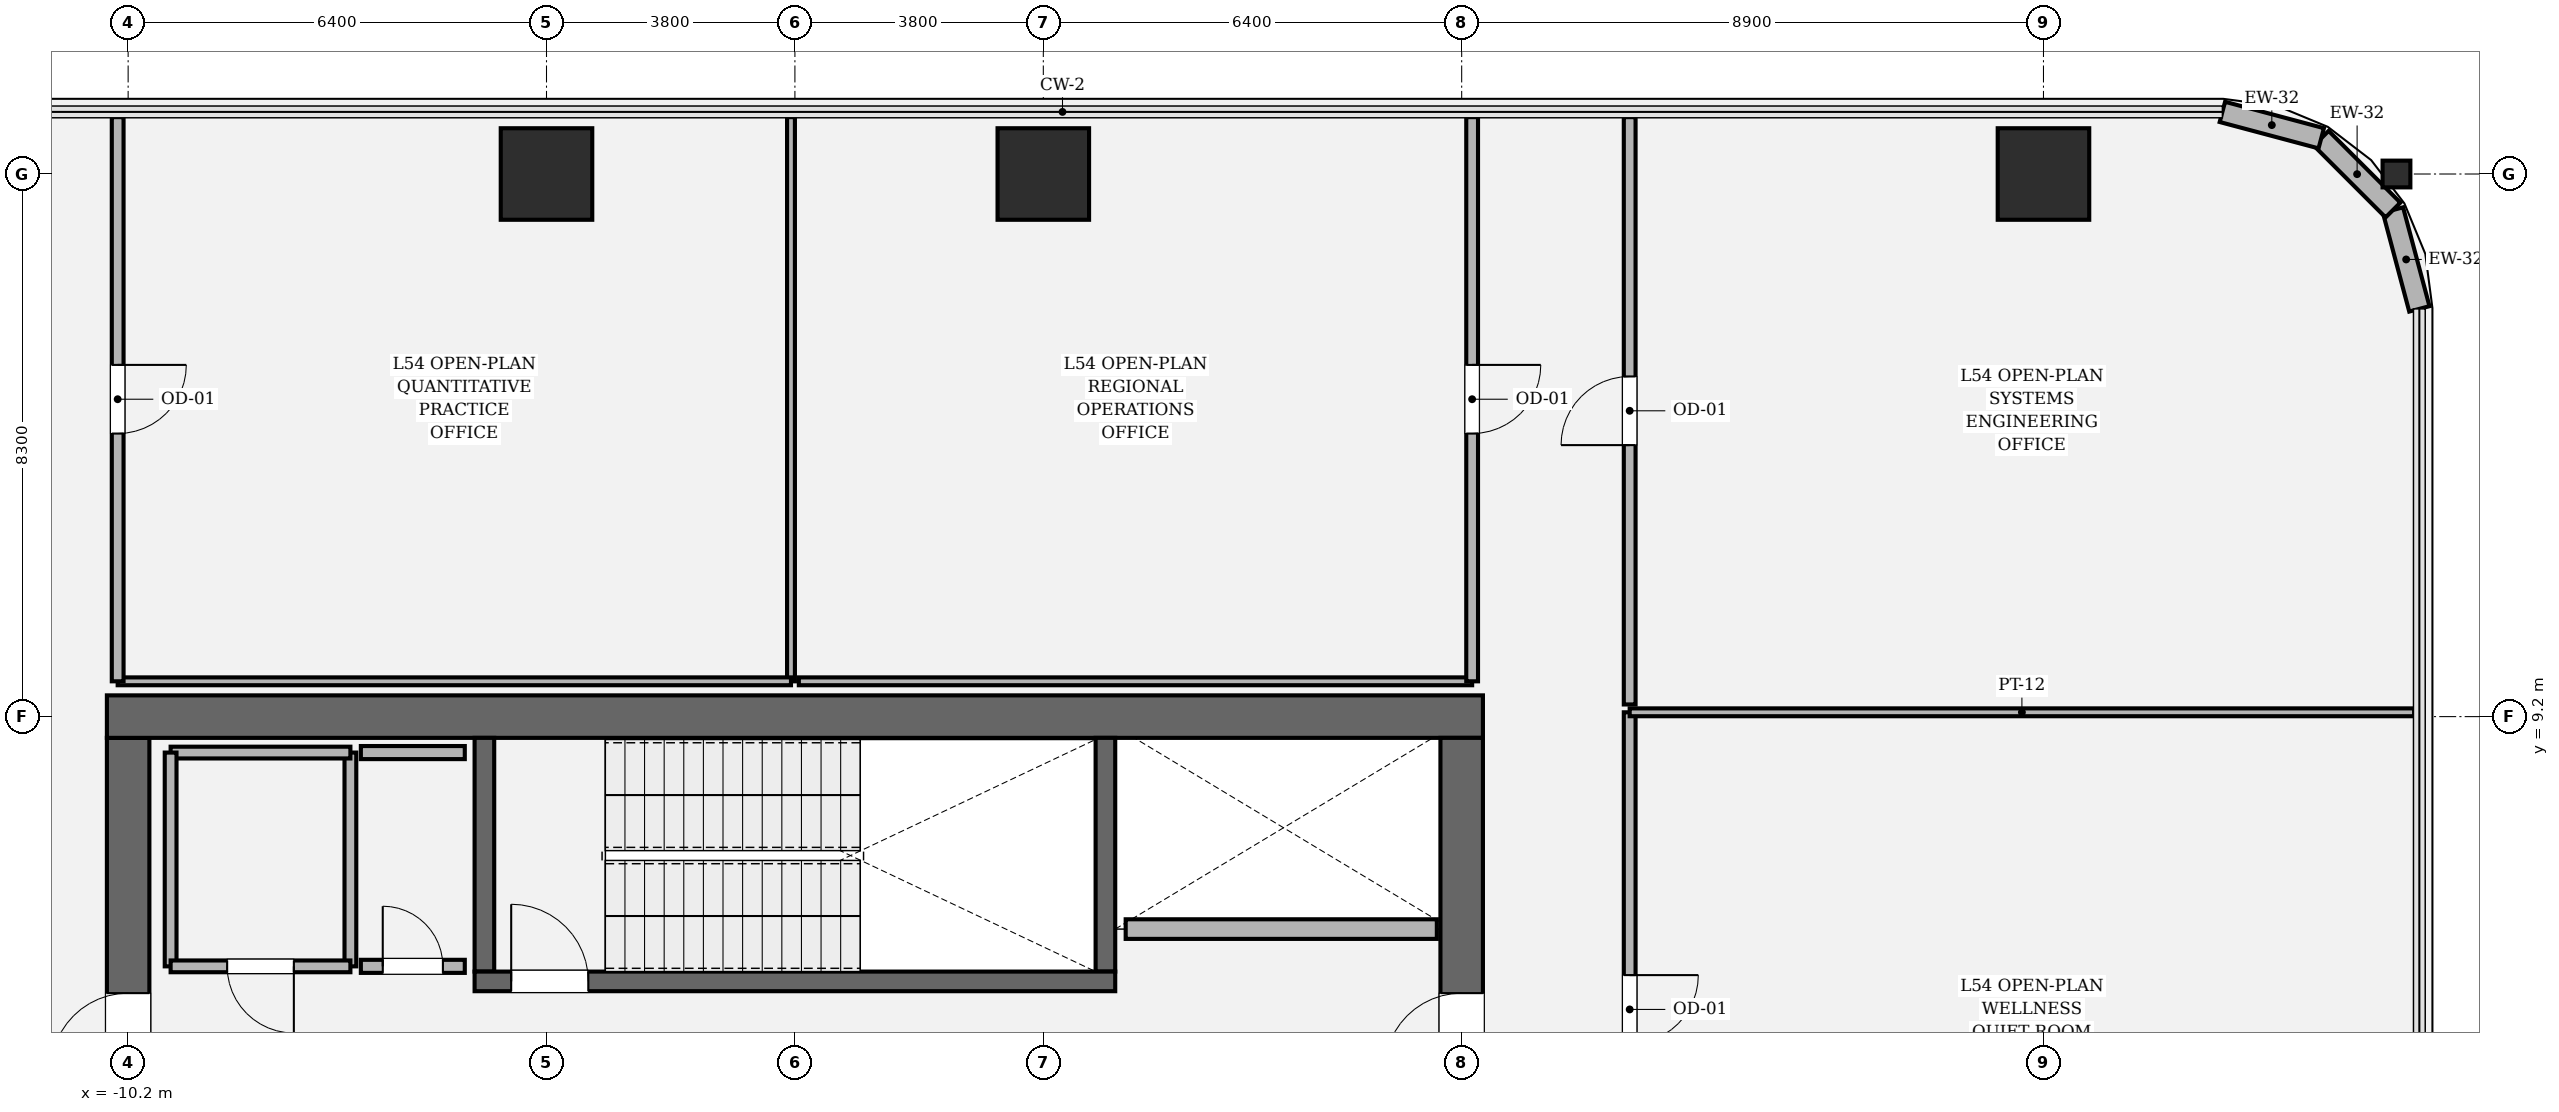
"""IFC4 building model, lengths in metres.
Left out: names, types, materials, properties, quantities, classifications, styles, units other than length and angle.
Written with IfcOpenShell. Run it as: python <this file> out.ifc"""

import sys

from ifc_helpers import new_model, si_unit, direction, frame, frame_2d, origin, origin_2d, place, context, subcontext, project, spatial, rectangle, hollow_rectangle, i_section, extrude, element, fill, save


model = new_model("IFC4")
c1 = context("Model", 3, precision=1e-05, world=origin(), true_north=direction((0.0, 1.0)))
c2 = subcontext(c1, "Body", "Model", "MODEL_VIEW")
j1 = project(units=[si_unit("LENGTHUNIT", "METRE"), si_unit("PLANEANGLEUNIT", "RADIAN")], contexts=[c1])
p1 = place(None, origin())
s1 = spatial("IfcSite", under=j1, at=p1, CompositionType="ELEMENT")
p2 = place(p1, origin())
s2 = spatial("IfcBuilding", under=s1, at=p2, CompositionType="ELEMENT")
p3 = place(p2, frame((0.0, 0.0, 228.9)))
s3 = spatial("IfcBuildingStorey", under=s2, at=p3, CompositionType="ELEMENT", Elevation=228.9)
p4 = place(p3, frame((-10.2, -8.875, 0.0), z_axis=(0.0, 0.0, 1.0), x_axis=(0.0, 1.0, 0.0)))
e1 = element("IfcWall", 1, at=p4, inside=s3, PredefinedType="SHEAR", context=c2, shape_type="SweptSolid", body=[
    extrude(rectangle(XDim=17.75, YDim=0.65, at=frame_2d((8.875, 0.0))), origin(), (0.0, 0.0, 1.0), 4.05),
])
p5 = place(p4, frame((12.665, 0.0, 0.0)))
e2 = element("IfcOpeningElement", 2, at=p5, cuts=e1, PredefinedType="OPENING", context=c2, shape_type="SweptSolid", body=[
    extrude(rectangle(XDim=1.18, YDim=2.2, at=frame_2d((0.59, 1.1))), frame((0.0, 0.335, 0.0), z_axis=(0.0, -1.0, 0.0), x_axis=(1.0, 0.0, 0.0)), (0.0, 0.0, 1.0), 0.67),
])
p6 = place(p3, frame((-10.525, 9.2, 0.0), z_axis=(0.0, 0.0, 1.0), x_axis=(1.0, 0.0, 0.0)))
e3 = element("IfcWall", 3, at=p6, inside=s3, PredefinedType="SHEAR", context=c2, shape_type="SweptSolid", body=[
    extrude(rectangle(XDim=21.05, YDim=0.65, at=frame_2d((10.525, 0.0))), origin(), (0.0, 0.0, 1.0), 4.05),
])
p7 = place(p3, frame((10.2, 8.875, 0.0), z_axis=(0.0, 0.0, 1.0), x_axis=(0.0, -1.0, 0.0)))
e4 = element("IfcWall", 4, at=p7, inside=s3, PredefinedType="SHEAR", context=c2, shape_type="SweptSolid", body=[
    extrude(rectangle(XDim=17.75, YDim=0.65, at=frame_2d((8.875, 0.0))), origin(), (0.0, 0.0, 1.0), 4.05),
])
p8 = place(p7, frame((3.905, 0.0, 0.0)))
e5 = element("IfcOpeningElement", 5, at=p8, cuts=e4, PredefinedType="OPENING", context=c2, shape_type="SweptSolid", body=[
    extrude(rectangle(XDim=1.18, YDim=2.2, at=frame_2d((0.59, 1.1))), frame((0.0, 0.335, 0.0), z_axis=(0.0, -1.0, 0.0), x_axis=(1.0, 0.0, 0.0)), (0.0, 0.0, 1.0), 0.67),
])
for number, where, z_axis, x_axis in (
    (6, (-4.75, 5.3, 0.0), (0.0, 0.0, 1.0), (0.0, 1.0, 0.0)),
    (7, (4.75, 8.875, 0.0), (0.0, 0.0, 1.0), (0.0, -1.0, 0.0)),
):
    element("IfcWall", number, at=place(p3, frame(where, z_axis=z_axis, x_axis=x_axis)), inside=s3, PredefinedType="SOLIDWALL", context=c2, shape_type="SweptSolid", body=[
        extrude(rectangle(XDim=3.575, YDim=0.3, at=frame_2d((1.788, 0.0))), origin(), (0.0, 0.0, 1.0), 4.05),
    ])
p9 = place(p3, frame((-4.9, 5.15, 0.0), z_axis=(0.0, 0.0, 1.0), x_axis=(1.0, 0.0, 0.0)))
e8 = element("IfcWall", 8, at=p9, inside=s3, PredefinedType="SOLIDWALL", context=c2, shape_type="SweptSolid", body=[
    extrude(rectangle(XDim=9.8, YDim=0.3, at=frame_2d((4.9, 0.0))), origin(), (0.0, 0.0, 1.0), 4.05),
])
p10 = place(p9, frame((0.56, 0.0, 0.0)))
e9 = element("IfcOpeningElement", 9, at=p10, cuts=e8, PredefinedType="OPENING", context=c2, shape_type="SweptSolid", body=[
    extrude(rectangle(XDim=1.18, YDim=2.2, at=frame_2d((0.59, 1.1))), frame((0.0, 0.16, 0.0), z_axis=(0.0, -1.0, 0.0), x_axis=(1.0, 0.0, 0.0)), (0.0, 0.0, 1.0), 0.32),
])
for number, where, z_axis, x_axis in (
    (10, (19.1, 17.5, 0.0), (0.0, 0.0, 1.0), (1.0, 0.0, 0.0)),
    (11, (3.8, 17.5, 0.0), (0.0, 0.0, 1.0), (1.0, 0.0, 0.0)),
    (12, (-3.8, 17.5, 0.0), (0.0, 0.0, 1.0), (1.0, 0.0, 0.0)),
):
    element("IfcColumn", number, at=place(p3, frame(where, z_axis=z_axis, x_axis=x_axis)), inside=s3, PredefinedType="COLUMN", context=c2, shape_type="SweptSolid", body=[
        extrude(hollow_rectangle(XDim=1.4, YDim=1.4, WallThickness=0.042, at=origin_2d()), origin(), (0.0, 0.0, 1.0), 4.05),
    ])
p11 = place(p3, frame((24.5, 17.5, 0.0), z_axis=(0.0, 0.0, 1.0), x_axis=(0.0, 1.0, 0.0)))
e13 = element("IfcColumn", 13, at=p11, inside=s3, PredefinedType="COLUMN", context=c2, shape_type="SweptSolid", body=[
    extrude(i_section(OverallWidth=0.409, OverallDepth=0.425, WebThickness=0.032, FlangeThickness=0.052, FilletRadius=0.018, at=origin_2d()), origin(), (0.0, 0.0, 1.0), 4.048),
])
p12 = place(p3, frame((24.85, 15.437, 0.0), z_axis=(0.0, 0.0, 1.0), x_axis=(-0.257847112249, 0.966185730957, 0.0)))
e14 = element("IfcWall", 14, at=p12, inside=s3, PredefinedType="SOLIDWALL", context=c2, shape_type="SweptSolid", body=[
    extrude(rectangle(XDim=1.565, YDim=0.32, at=frame_2d((0.783, 0.0))), origin(), (0.0, 0.0, 1.0), 2.544),
])
p13 = place(p3, frame((24.447, 16.949, 0.0), z_axis=(0.0, 0.0, 1.0), x_axis=(-0.707106781187, 0.707106781187, 0.0)))
e15 = element("IfcWall", 15, at=p13, inside=s3, PredefinedType="SOLIDWALL", context=c2, shape_type="SweptSolid", body=[
    extrude(rectangle(XDim=1.552, YDim=0.32, at=frame_2d((0.776, 0.0))), origin(), (0.0, 0.0, 1.0), 2.504),
])
p14 = place(p3, frame((23.349, 18.047, 0.0), z_axis=(0.0, 0.0, 1.0), x_axis=(-0.966224582397, 0.257701486942, 0.0)))
e16 = element("IfcWall", 16, at=p14, inside=s3, PredefinedType="SOLIDWALL", context=c2, shape_type="SweptSolid", body=[
    extrude(rectangle(XDim=1.565, YDim=0.32, at=frame_2d((0.783, 0.0))), origin(), (0.0, 0.0, 1.0), 3.83),
])
p15 = place(p3, frame((5.06, 5.95, 0.0), z_axis=(0.0, 0.0, 1.0), x_axis=(1.0, 0.0, 0.0)))
e17 = element("IfcWall", 17, at=p15, inside=s3, PredefinedType="SOLIDWALL", context=c2, shape_type="SweptSolid", body=[
    extrude(rectangle(XDim=4.76, YDim=0.3, at=frame_2d((2.38, 0.0))), origin(), (0.0, 0.0, 1.0), 3.83),
])
p16 = place(p3, frame((-6.8, 5.38, 0.0), z_axis=(0.0, 0.0, 1.0), x_axis=(0.0, 1.0, 0.0)))
e18 = element("IfcWall", 18, at=p16, inside=s3, PredefinedType="PARTITIONING", context=c2, shape_type="SweptSolid", body=[
    extrude(rectangle(XDim=3.27, YDim=0.18, at=frame_2d((1.635, 0.0))), origin(), (0.0, 0.0, 1.0), 3.83),
])
p17 = place(p3, frame((-6.8, 8.65, 0.0), z_axis=(0.0, 0.0, 1.0), x_axis=(-1.0, 0.0, 0.0)))
e19 = element("IfcWall", 19, at=p17, inside=s3, PredefinedType="PARTITIONING", context=c2, shape_type="SweptSolid", body=[
    extrude(rectangle(XDim=2.75, YDim=0.18, at=frame_2d((1.375, 0.0))), origin(), (0.0, 0.0, 1.0), 3.83),
])
p18 = place(p3, frame((-9.55, 8.65, 0.0), z_axis=(0.0, 0.0, 1.0), x_axis=(0.0, -1.0, 0.0)))
e20 = element("IfcWall", 20, at=p18, inside=s3, PredefinedType="PARTITIONING", context=c2, shape_type="SweptSolid", body=[
    extrude(rectangle(XDim=3.27, YDim=0.18, at=frame_2d((1.635, 0.0))), origin(), (0.0, 0.0, 1.0), 3.83),
])
p19 = place(p3, frame((-9.55, 5.38, 0.0), z_axis=(0.0, 0.0, 1.0), x_axis=(1.0, 0.0, 0.0)))
e21 = element("IfcWall", 21, at=p19, inside=s3, PredefinedType="PARTITIONING", context=c2, shape_type="SweptSolid", body=[
    extrude(rectangle(XDim=2.75, YDim=0.18, at=frame_2d((1.375, 0.0))), origin(), (0.0, 0.0, 1.0), 3.83),
])
p20 = place(p19, frame((0.865, 0.0, 0.0)))
e22 = element("IfcOpeningElement", 22, at=p20, cuts=e21, PredefinedType="OPENING", context=c2, shape_type="SweptSolid", body=[
    extrude(rectangle(XDim=1.02, YDim=2.2, at=frame_2d((0.51, 1.1))), frame((0.0, 0.1, 0.0), z_axis=(0.0, -1.0, 0.0), x_axis=(1.0, 0.0, 0.0)), (0.0, 0.0, 1.0), 0.2),
])
p21 = place(p3, frame((-5.05, 8.65, 0.0), z_axis=(0.0, 0.0, 1.0), x_axis=(-1.0, 0.0, 0.0)))
e23 = element("IfcWall", 23, at=p21, inside=s3, PredefinedType="SOLIDWALL", context=c2, shape_type="SweptSolid", body=[
    extrude(rectangle(XDim=1.59, YDim=0.2, at=frame_2d((0.795, 0.0))), origin(), (0.0, 0.0, 1.0), 3.83),
])
p22 = place(p3, frame((-6.64, 5.38, 0.0), z_axis=(0.0, 0.0, 1.0), x_axis=(1.0, 0.0, 0.0)))
e24 = element("IfcWall", 24, at=p22, inside=s3, PredefinedType="SOLIDWALL", context=c2, shape_type="SweptSolid", body=[
    extrude(rectangle(XDim=1.59, YDim=0.2, at=frame_2d((0.795, 0.0))), origin(), (0.0, 0.0, 1.0), 3.83),
])
p23 = place(p22, frame((0.335, 0.0, 0.0)))
e25 = element("IfcOpeningElement", 25, at=p23, cuts=e24, PredefinedType="OPENING", context=c2, shape_type="SweptSolid", body=[
    extrude(rectangle(XDim=0.92, YDim=2.1, at=frame_2d((0.46, 1.05))), frame((0.0, 0.11, 0.0), z_axis=(0.0, -1.0, 0.0), x_axis=(1.0, 0.0, 0.0)), (0.0, 0.0, 1.0), 0.22),
])
p24 = place(p3, frame((12.77, 0.176, 0.0), z_axis=(0.0, 0.0, 1.0), x_axis=(0.0, 1.0, 0.0)))
e26 = element("IfcWall", 26, at=p24, inside=s3, PredefinedType="PARTITIONING", context=c2, shape_type="SweptSolid", body=[
    extrude(rectangle(XDim=9.09, YDim=0.18, at=frame_2d((4.545, 0.0))), origin(), (0.0, 0.0, 1.0), 3.174),
])
p25 = place(p24, frame((4.02, 0.0, 0.0)))
e27 = element("IfcOpeningElement", 27, at=p25, cuts=e26, PredefinedType="OPENING", context=c2, shape_type="SweptSolid", body=[
    extrude(rectangle(XDim=1.05, YDim=2.2, at=frame_2d((0.525, 1.1))), frame((0.0, 0.1, 0.0), z_axis=(0.0, -1.0, 0.0), x_axis=(1.0, 0.0, 0.0)), (0.0, 0.0, 1.0), 0.2),
])
p26 = place(p3, frame((12.77, 9.266, 0.0), z_axis=(0.0, 0.0, 1.0), x_axis=(1.0, 0.0, 0.0)))
e28 = element("IfcWall", 28, at=p26, inside=s3, PredefinedType="PARTITIONING", context=c2, shape_type="SweptSolid", body=[
    extrude(rectangle(XDim=12.0, YDim=0.12, at=frame_2d((6.0, 0.0))), origin(), (0.0, 0.0, 1.0), 2.544),
])
p27 = place(p3, frame((12.77, 9.386, 0.0), z_axis=(0.0, 0.0, 1.0), x_axis=(0.0, 1.0, 0.0)))
e29 = element("IfcWall", 29, at=p27, inside=s3, PredefinedType="PARTITIONING", context=c2, shape_type="SweptSolid", body=[
    extrude(rectangle(XDim=8.984, YDim=0.18, at=frame_2d((4.492, 0.0))), origin(), (0.0, 0.0, 1.0), 3.174),
])
p28 = place(p27, frame((3.967, 0.0, 0.0)))
e30 = element("IfcOpeningElement", 30, at=p28, cuts=e29, PredefinedType="OPENING", context=c2, shape_type="SweptSolid", body=[
    extrude(rectangle(XDim=1.05, YDim=2.2, at=frame_2d((0.525, 1.1))), frame((0.0, 0.1, 0.0), z_axis=(0.0, -1.0, 0.0), x_axis=(1.0, 0.0, 0.0)), (0.0, 0.0, 1.0), 0.2),
])
p29 = place(p3, frame((-0.06, 18.37, 0.0), z_axis=(0.0, 0.0, 1.0), x_axis=(0.0, -1.0, 0.0)))
e31 = element("IfcWall", 31, at=p29, inside=s3, PredefinedType="PARTITIONING", context=c2, shape_type="SweptSolid", body=[
    extrude(rectangle(XDim=8.63, YDim=0.12, at=frame_2d((4.315, 0.0))), origin(), (0.0, 0.0, 1.0), 3.174),
])
p30 = place(p3, frame((-0.06, 9.74, 0.0), z_axis=(0.0, 0.0, 1.0), x_axis=(-1.0, 0.0, 0.0)))
e32 = element("IfcWall", 32, at=p30, inside=s3, PredefinedType="PARTITIONING", context=c2, shape_type="SweptSolid", body=[
    extrude(rectangle(XDim=10.3, YDim=0.12, at=frame_2d((5.15, 0.0))), origin(), (0.0, 0.0, 1.0), 3.174),
])
p31 = place(p3, frame((-10.36, 9.74, 0.0), z_axis=(0.0, 0.0, 1.0), x_axis=(0.0, 1.0, 0.0)))
e33 = element("IfcWall", 33, at=p31, inside=s3, PredefinedType="PARTITIONING", context=c2, shape_type="SweptSolid", body=[
    extrude(rectangle(XDim=8.63, YDim=0.18, at=frame_2d((4.315, 0.0))), origin(), (0.0, 0.0, 1.0), 3.174),
])
p32 = place(p31, frame((3.79, 0.0, 0.0)))
e34 = element("IfcOpeningElement", 34, at=p32, cuts=e33, PredefinedType="OPENING", context=c2, shape_type="SweptSolid", body=[
    extrude(rectangle(XDim=1.05, YDim=2.2, at=frame_2d((0.525, 1.1))), frame((0.0, 0.1, 0.0), z_axis=(0.0, -1.0, 0.0), x_axis=(1.0, 0.0, 0.0)), (0.0, 0.0, 1.0), 0.2),
])
p33 = place(p3, frame((10.36, 9.74, 0.0), z_axis=(0.0, 0.0, 1.0), x_axis=(-1.0, 0.0, 0.0)))
e35 = element("IfcWall", 35, at=p33, inside=s3, PredefinedType="PARTITIONING", context=c2, shape_type="SweptSolid", body=[
    extrude(rectangle(XDim=10.3, YDim=0.12, at=frame_2d((5.15, 0.0))), origin(), (0.0, 0.0, 1.0), 3.174),
])
p34 = place(p3, frame((10.36, 18.37, 0.0), z_axis=(0.0, 0.0, 1.0), x_axis=(0.0, -1.0, 0.0)))
e36 = element("IfcWall", 36, at=p34, inside=s3, PredefinedType="PARTITIONING", context=c2, shape_type="SweptSolid", body=[
    extrude(rectangle(XDim=8.63, YDim=0.18, at=frame_2d((4.315, 0.0))), origin(), (0.0, 0.0, 1.0), 3.174),
])
p35 = place(p34, frame((3.79, 0.0, 0.0)))
e37 = element("IfcOpeningElement", 37, at=p35, cuts=e36, PredefinedType="OPENING", context=c2, shape_type="SweptSolid", body=[
    extrude(rectangle(XDim=1.05, YDim=2.2, at=frame_2d((0.525, 1.1))), frame((0.0, 0.1, 0.0), z_axis=(0.0, -1.0, 0.0), x_axis=(1.0, 0.0, 0.0)), (0.0, 0.0, 1.0), 0.2),
])
p36 = place(p10, origin())
e38 = element("IfcDoor", 38, at=p36, inside=s3, OperationType="SINGLE_SWING_LEFT", PredefinedType="DOOR", context=c2, shape_type="SweptSolid", body=[
    extrude(rectangle(XDim=1.18, YDim=2.2, at=frame_2d((0.59, 1.1))), frame((0.0, 0.025, 0.0), z_axis=(0.0, -1.0, 0.0), x_axis=(1.0, 0.0, 0.0)), (0.0, 0.0, 1.0), 0.05),
])
fill(e9, e38)
p37 = place(p5, origin())
e39 = element("IfcDoor", 39, at=p37, inside=s3, OperationType="SINGLE_SWING_LEFT", PredefinedType="DOOR", context=c2, shape_type="SweptSolid", body=[
    extrude(rectangle(XDim=1.18, YDim=2.2, at=frame_2d((0.59, 1.1))), frame((0.0, 0.025, 0.0), z_axis=(0.0, -1.0, 0.0), x_axis=(1.0, 0.0, 0.0)), (0.0, 0.0, 1.0), 0.05),
])
fill(e2, e39)
p38 = place(p8, origin())
e40 = element("IfcDoor", 40, at=p38, inside=s3, OperationType="SINGLE_SWING_RIGHT", PredefinedType="DOOR", context=c2, shape_type="SweptSolid", body=[
    extrude(rectangle(XDim=1.18, YDim=2.2, at=frame_2d((0.59, 1.1))), frame((0.0, 0.025, 0.0), z_axis=(0.0, -1.0, 0.0), x_axis=(1.0, 0.0, 0.0)), (0.0, 0.0, 1.0), 0.05),
])
fill(e5, e40)
p39 = place(p20, origin())
e41 = element("IfcDoor", 41, at=p39, inside=s3, OperationType="SINGLE_SWING_RIGHT", PredefinedType="DOOR", context=c2, shape_type="SweptSolid", body=[
    extrude(rectangle(XDim=1.02, YDim=2.2, at=frame_2d((0.51, 1.1))), frame((0.0, 0.025, 0.0), z_axis=(0.0, -1.0, 0.0), x_axis=(1.0, 0.0, 0.0)), (0.0, 0.0, 1.0), 0.05),
])
fill(e22, e41)
p40 = place(p23, origin())
e42 = element("IfcDoor", 42, at=p40, inside=s3, OperationType="SINGLE_SWING_LEFT", PredefinedType="DOOR", context=c2, shape_type="SweptSolid", body=[
    extrude(rectangle(XDim=0.92, YDim=2.1, at=frame_2d((0.46, 1.05))), frame((0.0, 0.025, 0.0), z_axis=(0.0, -1.0, 0.0), x_axis=(1.0, 0.0, 0.0)), (0.0, 0.0, 1.0), 0.05),
])
fill(e25, e42)
p41 = place(p25, origin())
e43 = element("IfcDoor", 43, at=p41, inside=s3, OperationType="SINGLE_SWING_RIGHT", PredefinedType="DOOR", context=c2, shape_type="SweptSolid", body=[
    extrude(rectangle(XDim=1.05, YDim=2.2, at=frame_2d((0.525, 1.1))), frame((0.0, 0.025, 0.0), z_axis=(0.0, -1.0, 0.0), x_axis=(1.0, 0.0, 0.0)), (0.0, 0.0, 1.0), 0.05),
])
fill(e27, e43)
p42 = place(p28, origin())
e44 = element("IfcDoor", 44, at=p42, inside=s3, OperationType="SINGLE_SWING_LEFT", PredefinedType="DOOR", context=c2, shape_type="SweptSolid", body=[
    extrude(rectangle(XDim=1.05, YDim=2.2, at=frame_2d((0.525, 1.1))), frame((0.0, 0.025, 0.0), z_axis=(0.0, -1.0, 0.0), x_axis=(1.0, 0.0, 0.0)), (0.0, 0.0, 1.0), 0.05),
])
fill(e30, e44)
p43 = place(p32, origin())
e45 = element("IfcDoor", 45, at=p43, inside=s3, OperationType="SINGLE_SWING_RIGHT", PredefinedType="DOOR", context=c2, shape_type="SweptSolid", body=[
    extrude(rectangle(XDim=1.05, YDim=2.2, at=frame_2d((0.525, 1.1))), frame((0.0, 0.025, 0.0), z_axis=(0.0, -1.0, 0.0), x_axis=(1.0, 0.0, 0.0)), (0.0, 0.0, 1.0), 0.05),
])
fill(e34, e45)
p44 = place(p35, origin())
e46 = element("IfcDoor", 46, at=p44, inside=s3, OperationType="SINGLE_SWING_LEFT", PredefinedType="DOOR", context=c2, shape_type="SweptSolid", body=[
    extrude(rectangle(XDim=1.05, YDim=2.2, at=frame_2d((0.525, 1.1))), frame((0.0, 0.025, 0.0), z_axis=(0.0, -1.0, 0.0), x_axis=(1.0, 0.0, 0.0)), (0.0, 0.0, 1.0), 0.05),
])
fill(e37, e46)
save(model, sys.argv[1])
